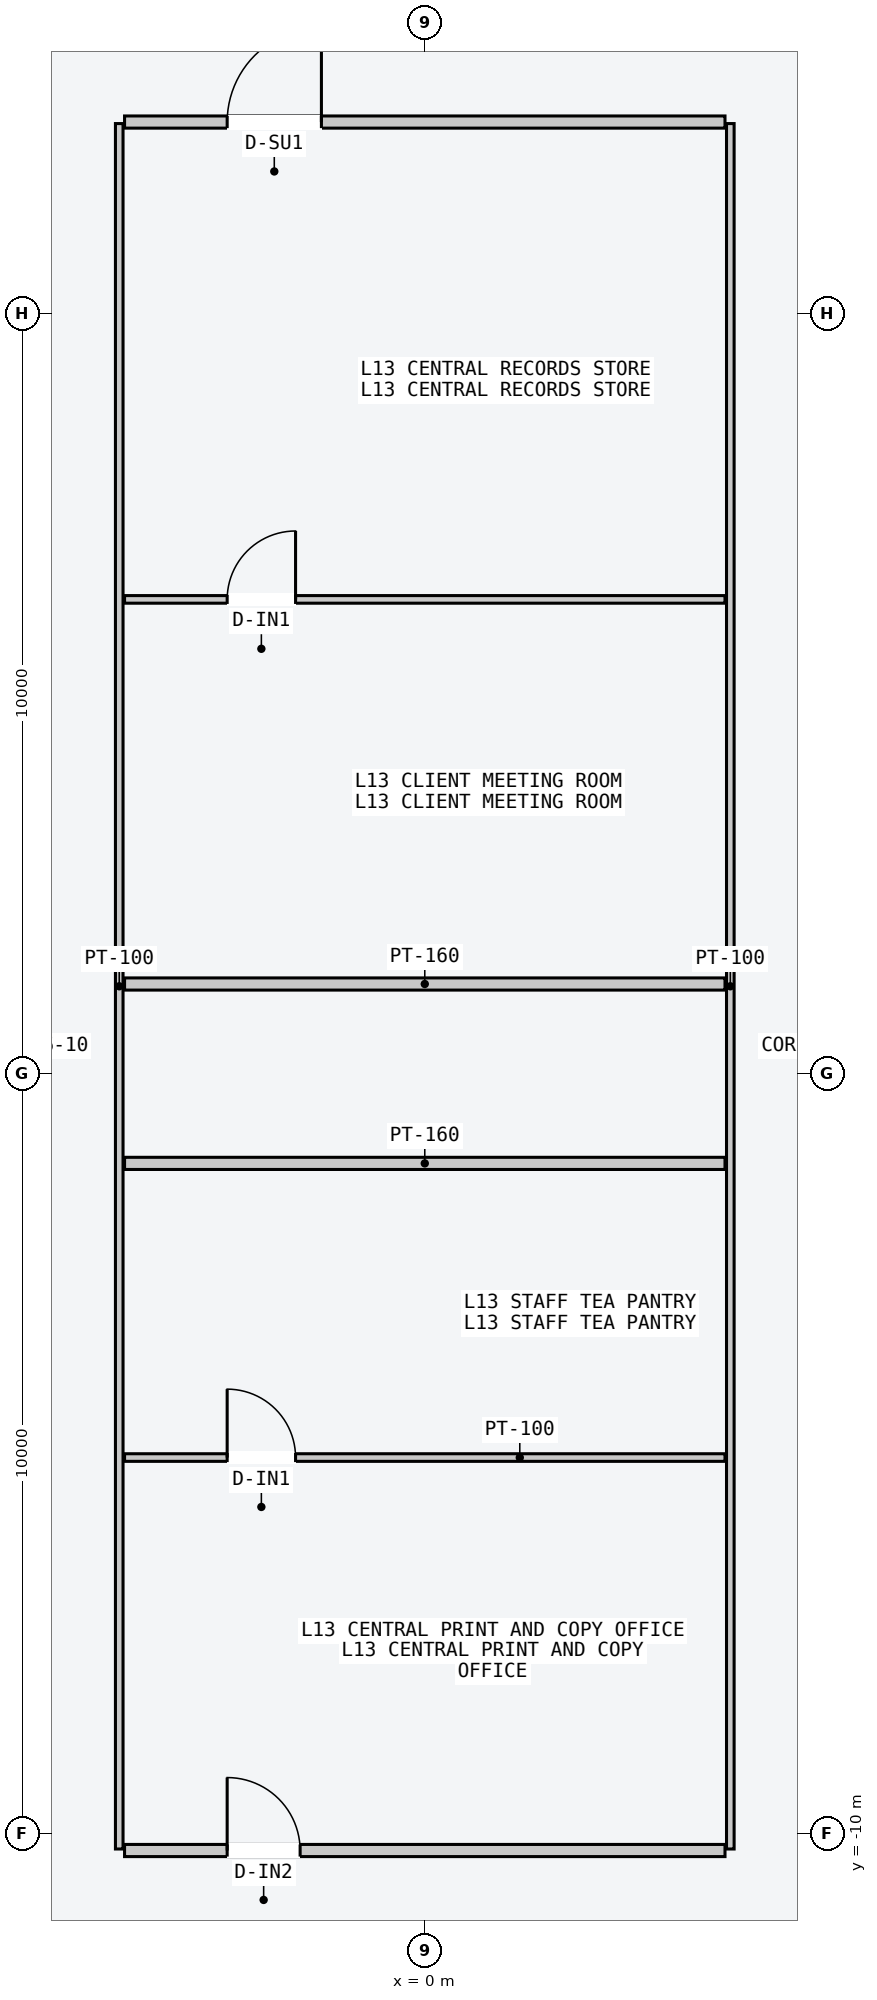
"""IFC4 building model, lengths in metres.
Left out: names, types, materials, properties, quantities, classifications, styles, units other than length and angle.
Written with IfcOpenShell. Run it as: python <this file> out.ifc"""

import sys

from ifc_helpers import new_model, si_unit, direction, frame, frame_2d, origin, place, context, subcontext, project, spatial, rectangle, extrude, element, fill, save


model = new_model("IFC4")
c1 = context("Model", 3, precision=1e-05, world=origin(), true_north=direction((0.0, 1.0)))
c2 = subcontext(c1, "Body", "Model", "MODEL_VIEW")
j1 = project(units=[si_unit("LENGTHUNIT", "METRE"), si_unit("PLANEANGLEUNIT", "RADIAN")], contexts=[c1])
p1 = place(None, origin())
s1 = spatial("IfcSite", under=j1, at=p1, CompositionType="ELEMENT")
p2 = place(p1, origin())
s2 = spatial("IfcBuilding", under=s1, at=p2, CompositionType="ELEMENT")
p3 = place(p2, frame((0.0, 0.0, 52.8)))
s3 = spatial("IfcBuildingStorey", under=s2, at=p3, CompositionType="ELEMENT", Elevation=52.8)
for number, where, z_axis, x_axis in (
    (1, (-4.02, -10.2, 0.0), (0.0, 0.0, 1.0), (0.0, 1.0, 0.0)),
    (2, (4.02, -10.2, 0.0), (0.0, 0.0, 1.0), (0.0, 1.0, 0.0)),
):
    element("IfcWall", number, at=place(p3, frame(where, z_axis=z_axis, x_axis=x_axis)), inside=s3, PredefinedType="PARTITIONING", context=c2, shape_type="SweptSolid", body=[
        extrude(rectangle(XDim=22.7, YDim=0.1, at=frame_2d((11.35, 0.0))), origin(), (0.0, 0.0, 1.0), 3.4),
    ])
p4 = place(p3, frame((-3.95, 1.18, 0.0), z_axis=(0.0, 0.0, 1.0), x_axis=(1.0, 0.0, 0.0)))
e3 = element("IfcWall", 3, at=p4, inside=s3, PredefinedType="PARTITIONING", context=c2, shape_type="SweptSolid", body=[
    extrude(rectangle(XDim=7.9, YDim=0.16, at=frame_2d((3.95, 0.0))), origin(), (0.0, 0.0, 1.0), 3.4),
])
p5 = place(p3, frame((-3.95, 12.52, 0.0), z_axis=(0.0, 0.0, 1.0), x_axis=(1.0, 0.0, 0.0)))
e4 = element("IfcWall", 4, at=p5, inside=s3, PredefinedType="PARTITIONING", context=c2, shape_type="SweptSolid", body=[
    extrude(rectangle(XDim=7.9, YDim=0.16, at=frame_2d((3.95, 0.0))), origin(), (0.0, 0.0, 1.0), 3.4),
])
p6 = place(p5, frame((1.35, 0.0, 0.0)))
e5 = element("IfcOpeningElement", 5, at=p6, cuts=e4, PredefinedType="OPENING", context=c2, shape_type="SweptSolid", body=[
    extrude(rectangle(XDim=1.24, YDim=2.24, at=frame_2d((0.62, 1.12))), frame((0.0, 0.09, 0.0), z_axis=(0.0, -1.0, 0.0), x_axis=(1.0, 0.0, 0.0)), (0.0, 0.0, 1.0), 0.18),
])
p7 = place(p3, frame((-3.95, -1.18, 0.0), z_axis=(0.0, 0.0, 1.0), x_axis=(1.0, 0.0, 0.0)))
e6 = element("IfcWall", 6, at=p7, inside=s3, PredefinedType="PARTITIONING", context=c2, shape_type="SweptSolid", body=[
    extrude(rectangle(XDim=7.9, YDim=0.16, at=frame_2d((3.95, 0.0))), origin(), (0.0, 0.0, 1.0), 3.4),
])
p8 = place(p3, frame((-3.95, -10.22, 0.0), z_axis=(0.0, 0.0, 1.0), x_axis=(1.0, 0.0, 0.0)))
e7 = element("IfcWall", 7, at=p8, inside=s3, PredefinedType="PARTITIONING", context=c2, shape_type="SweptSolid", body=[
    extrude(rectangle(XDim=7.9, YDim=0.16, at=frame_2d((3.95, 0.0))), origin(), (0.0, 0.0, 1.0), 3.4),
])
p9 = place(p8, frame((1.35, 0.0, 0.0)))
e8 = element("IfcOpeningElement", 8, at=p9, cuts=e7, PredefinedType="OPENING", context=c2, shape_type="SweptSolid", body=[
    extrude(rectangle(XDim=0.96, YDim=2.18, at=frame_2d((0.48, 1.09))), frame((0.0, 0.09, 0.0), z_axis=(0.0, -1.0, 0.0), x_axis=(1.0, 0.0, 0.0)), (0.0, 0.0, 1.0), 0.18),
])
p10 = place(p3, frame((-3.95, 6.24, 0.0), z_axis=(0.0, 0.0, 1.0), x_axis=(1.0, 0.0, 0.0)))
e9 = element("IfcWall", 9, at=p10, inside=s3, PredefinedType="PARTITIONING", context=c2, shape_type="SweptSolid", body=[
    extrude(rectangle(XDim=7.9, YDim=0.1, at=frame_2d((3.95, 0.0))), origin(), (0.0, 0.0, 1.0), 3.4),
])
p11 = place(p10, frame((1.35, 0.0, 0.0)))
e10 = element("IfcOpeningElement", 10, at=p11, cuts=e9, PredefinedType="OPENING", context=c2, shape_type="SweptSolid", body=[
    extrude(rectangle(XDim=0.9, YDim=2.15, at=frame_2d((0.45, 1.075))), frame((0.0, 0.06, 0.0), z_axis=(0.0, -1.0, 0.0), x_axis=(1.0, 0.0, 0.0)), (0.0, 0.0, 1.0), 0.12),
])
p12 = place(p3, frame((-3.95, -5.05, 0.0), z_axis=(0.0, 0.0, 1.0), x_axis=(1.0, 0.0, 0.0)))
e11 = element("IfcWall", 11, at=p12, inside=s3, PredefinedType="PARTITIONING", context=c2, shape_type="SweptSolid", body=[
    extrude(rectangle(XDim=7.9, YDim=0.1, at=frame_2d((3.95, 0.0))), origin(), (0.0, 0.0, 1.0), 3.4),
])
p13 = place(p12, frame((1.35, 0.0, 0.0)))
e12 = element("IfcOpeningElement", 12, at=p13, cuts=e11, PredefinedType="OPENING", context=c2, shape_type="SweptSolid", body=[
    extrude(rectangle(XDim=0.9, YDim=2.15, at=frame_2d((0.45, 1.075))), frame((0.0, 0.06, 0.0), z_axis=(0.0, -1.0, 0.0), x_axis=(1.0, 0.0, 0.0)), (0.0, 0.0, 1.0), 0.12),
])
p14 = place(p6, origin())
e13 = element("IfcDoor", 13, at=p14, inside=s3, OperationType="SINGLE_SWING_RIGHT", PredefinedType="DOOR", context=c2, shape_type="SweptSolid", body=[
    extrude(rectangle(XDim=1.24, YDim=2.24, at=frame_2d((0.62, 1.12))), frame((0.0, 0.025, 0.0), z_axis=(0.0, -1.0, 0.0), x_axis=(1.0, 0.0, 0.0)), (0.0, 0.0, 1.0), 0.05),
])
fill(e5, e13)
p15 = place(p9, origin())
e14 = element("IfcDoor", 14, at=p15, inside=s3, OperationType="SINGLE_SWING_LEFT", PredefinedType="DOOR", context=c2, shape_type="SweptSolid", body=[
    extrude(rectangle(XDim=0.96, YDim=2.18, at=frame_2d((0.48, 1.09))), frame((0.0, 0.025, 0.0), z_axis=(0.0, -1.0, 0.0), x_axis=(1.0, 0.0, 0.0)), (0.0, 0.0, 1.0), 0.05),
])
fill(e8, e14)
p16 = place(p11, origin())
e15 = element("IfcDoor", 15, at=p16, inside=s3, OperationType="SINGLE_SWING_RIGHT", PredefinedType="DOOR", context=c2, shape_type="SweptSolid", body=[
    extrude(rectangle(XDim=0.9, YDim=2.15, at=frame_2d((0.45, 1.075))), frame((0.0, 0.025, 0.0), z_axis=(0.0, -1.0, 0.0), x_axis=(1.0, 0.0, 0.0)), (0.0, 0.0, 1.0), 0.05),
])
fill(e10, e15)
p17 = place(p13, origin())
e16 = element("IfcDoor", 16, at=p17, inside=s3, OperationType="SINGLE_SWING_LEFT", PredefinedType="DOOR", context=c2, shape_type="SweptSolid", body=[
    extrude(rectangle(XDim=0.9, YDim=2.15, at=frame_2d((0.45, 1.075))), frame((0.0, 0.025, 0.0), z_axis=(0.0, -1.0, 0.0), x_axis=(1.0, 0.0, 0.0)), (0.0, 0.0, 1.0), 0.05),
])
fill(e12, e16)
save(model, sys.argv[1])
